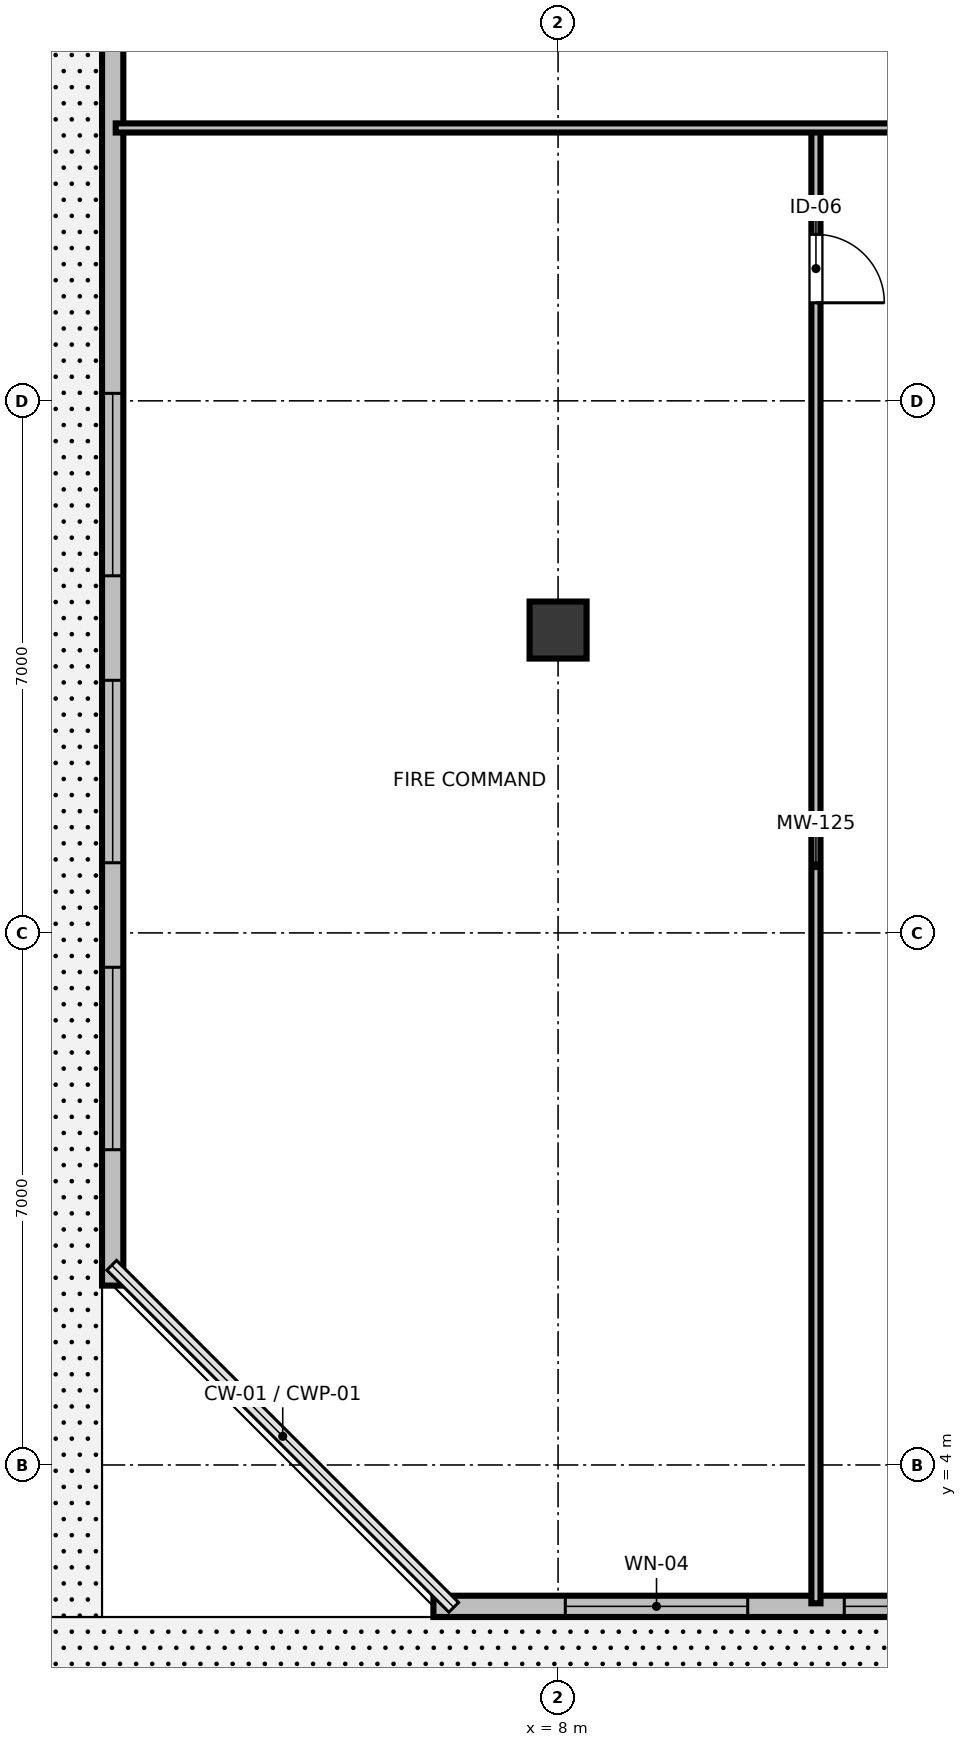
"""IFC4 building model, lengths in metres.
Left out: names, types, materials, properties, quantities, classifications, styles, units other than length and angle.
Written with IfcOpenShell. Run it as: python <this file> out.ifc"""

import sys

from ifc_helpers import new_model, si_unit, direction, frame, frame_2d, origin, origin_2d, place, context, subcontext, project, spatial, rectangle, extrude, element, fill, save


model = new_model("IFC4")
c1 = context("Model", 3, precision=1e-05, world=origin(), true_north=direction((0.0, 1.0)))
c2 = subcontext(c1, "Body", "Model", "MODEL_VIEW")
j1 = project(units=[si_unit("LENGTHUNIT", "METRE"), si_unit("PLANEANGLEUNIT", "RADIAN")], contexts=[c1])
p1 = place(None, origin())
s1 = spatial("IfcSite", under=j1, at=p1, CompositionType="ELEMENT")
p2 = place(p1, origin())
s2 = spatial("IfcBuilding", under=s1, at=p2, CompositionType="ELEMENT")
p3 = place(p2, origin())
s3 = spatial("IfcBuildingStorey", under=s2, at=p3, CompositionType="ELEMENT", Elevation=0.0)
p4 = place(p3, frame((6.36, 2.14, 0.0), z_axis=(0.0, 0.0, 1.0), x_axis=(1.0, 0.0, 0.0)))
e1 = element("IfcWall", 1, at=p4, inside=s3, PredefinedType="STANDARD", context=c2, shape_type="SweptSolid", body=[
    extrude(rectangle(XDim=79.28, YDim=0.28, at=frame_2d((39.64, 0.0))), origin(), (0.0, 0.0, 1.0), 4.72),
])
p5 = place(p4, frame((41.79, 0.0, 0.0)))
e2 = element("IfcOpeningElement", 2, at=p5, cuts=e1, PredefinedType="OPENING", context=c2, shape_type="SweptSolid", body=[
    extrude(rectangle(XDim=2.4, YDim=2.6, at=frame_2d((1.2, 1.3))), frame((0.0, 0.15, 0.0), z_axis=(0.0, -1.0, 0.0), x_axis=(1.0, 0.0, 0.0)), (0.0, 0.0, 1.0), 0.3),
])
p6 = place(p4, frame((1.735, 0.0, 0.85)))
e3 = element("IfcOpeningElement", 3, at=p6, cuts=e1, PredefinedType="OPENING", context=c2, shape_type="SweptSolid", body=[
    extrude(rectangle(XDim=2.4, YDim=2.4, at=frame_2d((1.2, 1.2))), frame((0.0, 0.15, 0.0), z_axis=(0.0, -1.0, 0.0), x_axis=(1.0, 0.0, 0.0)), (0.0, 0.0, 1.0), 0.3),
])
p7 = place(p4, frame((5.406, 0.0, 0.85)))
e4 = element("IfcOpeningElement", 4, at=p7, cuts=e1, PredefinedType="OPENING", context=c2, shape_type="SweptSolid", body=[
    extrude(rectangle(XDim=2.4, YDim=2.4, at=frame_2d((1.2, 1.2))), frame((0.0, 0.15, 0.0), z_axis=(0.0, -1.0, 0.0), x_axis=(1.0, 0.0, 0.0)), (0.0, 0.0, 1.0), 0.3),
])
p8 = place(p4, frame((9.076, 0.0, 0.85)))
e5 = element("IfcOpeningElement", 5, at=p8, cuts=e1, PredefinedType="OPENING", context=c2, shape_type="SweptSolid", body=[
    extrude(rectangle(XDim=2.4, YDim=2.4, at=frame_2d((1.2, 1.2))), frame((0.0, 0.15, 0.0), z_axis=(0.0, -1.0, 0.0), x_axis=(1.0, 0.0, 0.0)), (0.0, 0.0, 1.0), 0.3),
])
p9 = place(p4, frame((12.747, 0.0, 0.85)))
e6 = element("IfcOpeningElement", 6, at=p9, cuts=e1, PredefinedType="OPENING", context=c2, shape_type="SweptSolid", body=[
    extrude(rectangle(XDim=2.4, YDim=2.4, at=frame_2d((1.2, 1.2))), frame((0.0, 0.15, 0.0), z_axis=(0.0, -1.0, 0.0), x_axis=(1.0, 0.0, 0.0)), (0.0, 0.0, 1.0), 0.3),
])
p10 = place(p4, frame((16.417, 0.0, 0.85)))
e7 = element("IfcOpeningElement", 7, at=p10, cuts=e1, PredefinedType="OPENING", context=c2, shape_type="SweptSolid", body=[
    extrude(rectangle(XDim=2.4, YDim=2.4, at=frame_2d((1.2, 1.2))), frame((0.0, 0.15, 0.0), z_axis=(0.0, -1.0, 0.0), x_axis=(1.0, 0.0, 0.0)), (0.0, 0.0, 1.0), 0.3),
])
p11 = place(p4, frame((20.088, 0.0, 0.85)))
e8 = element("IfcOpeningElement", 8, at=p11, cuts=e1, PredefinedType="OPENING", context=c2, shape_type="SweptSolid", body=[
    extrude(rectangle(XDim=2.4, YDim=2.4, at=frame_2d((1.2, 1.2))), frame((0.0, 0.15, 0.0), z_axis=(0.0, -1.0, 0.0), x_axis=(1.0, 0.0, 0.0)), (0.0, 0.0, 1.0), 0.3),
])
p12 = place(p4, frame((23.758, 0.0, 0.85)))
e9 = element("IfcOpeningElement", 9, at=p12, cuts=e1, PredefinedType="OPENING", context=c2, shape_type="SweptSolid", body=[
    extrude(rectangle(XDim=2.4, YDim=2.4, at=frame_2d((1.2, 1.2))), frame((0.0, 0.15, 0.0), z_axis=(0.0, -1.0, 0.0), x_axis=(1.0, 0.0, 0.0)), (0.0, 0.0, 1.0), 0.3),
])
p13 = place(p4, frame((31.099, 0.0, 0.85)))
e10 = element("IfcOpeningElement", 10, at=p13, cuts=e1, PredefinedType="OPENING", context=c2, shape_type="SweptSolid", body=[
    extrude(rectangle(XDim=2.4, YDim=2.4, at=frame_2d((1.2, 1.2))), frame((0.0, 0.15, 0.0), z_axis=(0.0, -1.0, 0.0), x_axis=(1.0, 0.0, 0.0)), (0.0, 0.0, 1.0), 0.3),
])
p14 = place(p4, frame((34.77, 0.0, 0.85)))
e11 = element("IfcOpeningElement", 11, at=p14, cuts=e1, PredefinedType="OPENING", context=c2, shape_type="SweptSolid", body=[
    extrude(rectangle(XDim=2.4, YDim=2.4, at=frame_2d((1.2, 1.2))), frame((0.0, 0.15, 0.0), z_axis=(0.0, -1.0, 0.0), x_axis=(1.0, 0.0, 0.0)), (0.0, 0.0, 1.0), 0.3),
])
p15 = place(p4, frame((45.781, 0.0, 0.85)))
e12 = element("IfcOpeningElement", 12, at=p15, cuts=e1, PredefinedType="OPENING", context=c2, shape_type="SweptSolid", body=[
    extrude(rectangle(XDim=2.4, YDim=2.4, at=frame_2d((1.2, 1.2))), frame((0.0, 0.15, 0.0), z_axis=(0.0, -1.0, 0.0), x_axis=(1.0, 0.0, 0.0)), (0.0, 0.0, 1.0), 0.3),
])
p16 = place(p4, frame((53.122, 0.0, 0.85)))
e13 = element("IfcOpeningElement", 13, at=p16, cuts=e1, PredefinedType="OPENING", context=c2, shape_type="SweptSolid", body=[
    extrude(rectangle(XDim=2.4, YDim=2.4, at=frame_2d((1.2, 1.2))), frame((0.0, 0.15, 0.0), z_axis=(0.0, -1.0, 0.0), x_axis=(1.0, 0.0, 0.0)), (0.0, 0.0, 1.0), 0.3),
])
p17 = place(p4, frame((56.792, 0.0, 0.85)))
e14 = element("IfcOpeningElement", 14, at=p17, cuts=e1, PredefinedType="OPENING", context=c2, shape_type="SweptSolid", body=[
    extrude(rectangle(XDim=2.4, YDim=2.4, at=frame_2d((1.2, 1.2))), frame((0.0, 0.15, 0.0), z_axis=(0.0, -1.0, 0.0), x_axis=(1.0, 0.0, 0.0)), (0.0, 0.0, 1.0), 0.3),
])
p18 = place(p4, frame((60.463, 0.0, 0.85)))
e15 = element("IfcOpeningElement", 15, at=p18, cuts=e1, PredefinedType="OPENING", context=c2, shape_type="SweptSolid", body=[
    extrude(rectangle(XDim=2.4, YDim=2.4, at=frame_2d((1.2, 1.2))), frame((0.0, 0.15, 0.0), z_axis=(0.0, -1.0, 0.0), x_axis=(1.0, 0.0, 0.0)), (0.0, 0.0, 1.0), 0.3),
])
p19 = place(p4, frame((64.133, 0.0, 0.85)))
e16 = element("IfcOpeningElement", 16, at=p19, cuts=e1, PredefinedType="OPENING", context=c2, shape_type="SweptSolid", body=[
    extrude(rectangle(XDim=2.4, YDim=2.4, at=frame_2d((1.2, 1.2))), frame((0.0, 0.15, 0.0), z_axis=(0.0, -1.0, 0.0), x_axis=(1.0, 0.0, 0.0)), (0.0, 0.0, 1.0), 0.3),
])
p20 = place(p4, frame((67.804, 0.0, 0.85)))
e17 = element("IfcOpeningElement", 17, at=p20, cuts=e1, PredefinedType="OPENING", context=c2, shape_type="SweptSolid", body=[
    extrude(rectangle(XDim=2.4, YDim=2.4, at=frame_2d((1.2, 1.2))), frame((0.0, 0.15, 0.0), z_axis=(0.0, -1.0, 0.0), x_axis=(1.0, 0.0, 0.0)), (0.0, 0.0, 1.0), 0.3),
])
p21 = place(p4, frame((71.474, 0.0, 0.85)))
e18 = element("IfcOpeningElement", 18, at=p21, cuts=e1, PredefinedType="OPENING", context=c2, shape_type="SweptSolid", body=[
    extrude(rectangle(XDim=2.4, YDim=2.4, at=frame_2d((1.2, 1.2))), frame((0.0, 0.15, 0.0), z_axis=(0.0, -1.0, 0.0), x_axis=(1.0, 0.0, 0.0)), (0.0, 0.0, 1.0), 0.3),
])
p22 = place(p4, frame((75.145, 0.0, 0.85)))
e19 = element("IfcOpeningElement", 19, at=p22, cuts=e1, PredefinedType="OPENING", context=c2, shape_type="SweptSolid", body=[
    extrude(rectangle(XDim=2.4, YDim=2.4, at=frame_2d((1.2, 1.2))), frame((0.0, 0.15, 0.0), z_axis=(0.0, -1.0, 0.0), x_axis=(1.0, 0.0, 0.0)), (0.0, 0.0, 1.0), 0.3),
])
p23 = place(p3, frame((2.14, 57.64, 0.0), z_axis=(0.0, 0.0, 1.0), x_axis=(0.0, -1.0, 0.0)))
e20 = element("IfcWall", 20, at=p23, inside=s3, PredefinedType="STANDARD", context=c2, shape_type="SweptSolid", body=[
    extrude(rectangle(XDim=51.28, YDim=0.28, at=frame_2d((25.64, 0.0))), origin(), (0.0, 0.0, 1.0), 4.72),
])
p24 = place(p23, frame((29.99, 0.0, 0.0)))
e21 = element("IfcOpeningElement", 21, at=p24, cuts=e20, PredefinedType="OPENING", context=c2, shape_type="SweptSolid", body=[
    extrude(rectangle(XDim=1.8, YDim=2.4, at=frame_2d((0.9, 1.2))), frame((0.0, 0.15, 0.0), z_axis=(0.0, -1.0, 0.0), x_axis=(1.0, 0.0, 0.0)), (0.0, 0.0, 1.0), 0.3),
])
p25 = place(p23, frame((1.788, 0.0, 0.85)))
e22 = element("IfcOpeningElement", 22, at=p25, cuts=e20, PredefinedType="OPENING", context=c2, shape_type="SweptSolid", body=[
    extrude(rectangle(XDim=2.4, YDim=2.4, at=frame_2d((1.2, 1.2))), frame((0.0, 0.15, 0.0), z_axis=(0.0, -1.0, 0.0), x_axis=(1.0, 0.0, 0.0)), (0.0, 0.0, 1.0), 0.3),
])
p26 = place(p23, frame((5.563, 0.0, 0.85)))
e23 = element("IfcOpeningElement", 23, at=p26, cuts=e20, PredefinedType="OPENING", context=c2, shape_type="SweptSolid", body=[
    extrude(rectangle(XDim=2.4, YDim=2.4, at=frame_2d((1.2, 1.2))), frame((0.0, 0.15, 0.0), z_axis=(0.0, -1.0, 0.0), x_axis=(1.0, 0.0, 0.0)), (0.0, 0.0, 1.0), 0.3),
])
p27 = place(p23, frame((9.338, 0.0, 0.85)))
e24 = element("IfcOpeningElement", 24, at=p27, cuts=e20, PredefinedType="OPENING", context=c2, shape_type="SweptSolid", body=[
    extrude(rectangle(XDim=2.4, YDim=2.4, at=frame_2d((1.2, 1.2))), frame((0.0, 0.15, 0.0), z_axis=(0.0, -1.0, 0.0), x_axis=(1.0, 0.0, 0.0)), (0.0, 0.0, 1.0), 0.3),
])
p28 = place(p23, frame((16.889, 0.0, 0.85)))
e25 = element("IfcOpeningElement", 25, at=p28, cuts=e20, PredefinedType="OPENING", context=c2, shape_type="SweptSolid", body=[
    extrude(rectangle(XDim=2.4, YDim=2.4, at=frame_2d((1.2, 1.2))), frame((0.0, 0.15, 0.0), z_axis=(0.0, -1.0, 0.0), x_axis=(1.0, 0.0, 0.0)), (0.0, 0.0, 1.0), 0.3),
])
p29 = place(p23, frame((20.665, 0.0, 0.85)))
e26 = element("IfcOpeningElement", 26, at=p29, cuts=e20, PredefinedType="OPENING", context=c2, shape_type="SweptSolid", body=[
    extrude(rectangle(XDim=2.4, YDim=2.4, at=frame_2d((1.2, 1.2))), frame((0.0, 0.15, 0.0), z_axis=(0.0, -1.0, 0.0), x_axis=(1.0, 0.0, 0.0)), (0.0, 0.0, 1.0), 0.3),
])
p30 = place(p23, frame((24.44, 0.0, 0.85)))
e27 = element("IfcOpeningElement", 27, at=p30, cuts=e20, PredefinedType="OPENING", context=c2, shape_type="SweptSolid", body=[
    extrude(rectangle(XDim=2.4, YDim=2.4, at=frame_2d((1.2, 1.2))), frame((0.0, 0.15, 0.0), z_axis=(0.0, -1.0, 0.0), x_axis=(1.0, 0.0, 0.0)), (0.0, 0.0, 1.0), 0.3),
])
p31 = place(p23, frame((39.542, 0.0, 0.85)))
e28 = element("IfcOpeningElement", 28, at=p31, cuts=e20, PredefinedType="OPENING", context=c2, shape_type="SweptSolid", body=[
    extrude(rectangle(XDim=2.4, YDim=2.4, at=frame_2d((1.2, 1.2))), frame((0.0, 0.15, 0.0), z_axis=(0.0, -1.0, 0.0), x_axis=(1.0, 0.0, 0.0)), (0.0, 0.0, 1.0), 0.3),
])
p32 = place(p23, frame((43.317, 0.0, 0.85)))
e29 = element("IfcOpeningElement", 29, at=p32, cuts=e20, PredefinedType="OPENING", context=c2, shape_type="SweptSolid", body=[
    extrude(rectangle(XDim=2.4, YDim=2.4, at=frame_2d((1.2, 1.2))), frame((0.0, 0.15, 0.0), z_axis=(0.0, -1.0, 0.0), x_axis=(1.0, 0.0, 0.0)), (0.0, 0.0, 1.0), 0.3),
])
p33 = place(p23, frame((47.092, 0.0, 0.85)))
e30 = element("IfcOpeningElement", 30, at=p33, cuts=e20, PredefinedType="OPENING", context=c2, shape_type="SweptSolid", body=[
    extrude(rectangle(XDim=2.4, YDim=2.4, at=frame_2d((1.2, 1.2))), frame((0.0, 0.15, 0.0), z_axis=(0.0, -1.0, 0.0), x_axis=(1.0, 0.0, 0.0)), (0.0, 0.0, 1.0), 0.3),
])
p34 = place(p3, frame((11.393, 21.59, 0.0), z_axis=(0.0, 0.0, 1.0), x_axis=(0.0, -1.0, 0.0)))
e31 = element("IfcWall", 31, at=p34, inside=s3, PredefinedType="MOVABLE", context=c2, shape_type="SweptSolid", body=[
    extrude(rectangle(XDim=19.41, YDim=0.12, at=frame_2d((9.705, 0.0))), origin(), (0.0, 0.0, 1.0), 3.82),
])
p35 = place(p34, frame((1.4, 0.0, 0.0)))
e32 = element("IfcOpeningElement", 32, at=p35, cuts=e31, PredefinedType="OPENING", context=c2, shape_type="SweptSolid", body=[
    extrude(rectangle(XDim=0.9, YDim=2.15, at=frame_2d((0.45, 1.075))), frame((0.0, 0.07, 0.0), z_axis=(0.0, -1.0, 0.0), x_axis=(1.0, 0.0, 0.0)), (0.0, 0.0, 1.0), 0.14),
])
p36 = place(p3, frame((34.65, 21.59, 0.0), z_axis=(0.0, 0.0, 1.0), x_axis=(-1.0, 0.0, 0.0)))
e33 = element("IfcWall", 33, at=p36, inside=s3, PredefinedType="PARTITIONING", context=c2, shape_type="SweptSolid", body=[
    extrude(rectangle(XDim=32.47, YDim=0.12, at=frame_2d((16.235, 0.0))), origin(), (0.0, 0.0, 1.0), 3.82),
])
p37 = place(p3, frame((8.0, 14.984, 0.0), z_axis=(0.0, 0.0, 1.0), x_axis=(1.0, 0.0, 0.0)))
e34 = element("IfcColumn", 34, at=p37, inside=s3, PredefinedType="PILASTER", context=c2, shape_type="SweptSolid", body=[
    extrude(rectangle(XDim=0.75, YDim=0.75, at=origin_2d()), origin(), (0.0, 0.0, 1.0), 4.72),
])
p38 = place(p6, origin())
e35 = element("IfcWindow", 35, at=p38, inside=s3, PartitioningType="SINGLE_PANEL", PredefinedType="WINDOW", context=c2, shape_type="SweptSolid", body=[
    extrude(rectangle(XDim=2.4, YDim=2.4, at=frame_2d((1.2, 1.2))), frame((0.0, 0.03, 0.0), z_axis=(0.0, -1.0, 0.0), x_axis=(1.0, 0.0, 0.0)), (0.0, 0.0, 1.0), 0.06),
])
fill(e3, e35)
p39 = place(p7, origin())
e36 = element("IfcWindow", 36, at=p39, inside=s3, PartitioningType="SINGLE_PANEL", PredefinedType="WINDOW", context=c2, shape_type="SweptSolid", body=[
    extrude(rectangle(XDim=2.4, YDim=2.4, at=frame_2d((1.2, 1.2))), frame((0.0, 0.03, 0.0), z_axis=(0.0, -1.0, 0.0), x_axis=(1.0, 0.0, 0.0)), (0.0, 0.0, 1.0), 0.06),
])
fill(e4, e36)
p40 = place(p31, origin())
e37 = element("IfcWindow", 37, at=p40, inside=s3, PartitioningType="SINGLE_PANEL", PredefinedType="WINDOW", context=c2, shape_type="SweptSolid", body=[
    extrude(rectangle(XDim=2.4, YDim=2.4, at=frame_2d((1.2, 1.2))), frame((0.0, 0.03, 0.0), z_axis=(0.0, -1.0, 0.0), x_axis=(1.0, 0.0, 0.0)), (0.0, 0.0, 1.0), 0.06),
])
fill(e28, e37)
p41 = place(p32, origin())
e38 = element("IfcWindow", 38, at=p41, inside=s3, PartitioningType="SINGLE_PANEL", PredefinedType="WINDOW", context=c2, shape_type="SweptSolid", body=[
    extrude(rectangle(XDim=2.4, YDim=2.4, at=frame_2d((1.2, 1.2))), frame((0.0, 0.03, 0.0), z_axis=(0.0, -1.0, 0.0), x_axis=(1.0, 0.0, 0.0)), (0.0, 0.0, 1.0), 0.06),
])
fill(e29, e38)
p42 = place(p33, origin())
e39 = element("IfcWindow", 39, at=p42, inside=s3, PartitioningType="SINGLE_PANEL", PredefinedType="WINDOW", context=c2, shape_type="SweptSolid", body=[
    extrude(rectangle(XDim=2.4, YDim=2.4, at=frame_2d((1.2, 1.2))), frame((0.0, 0.03, 0.0), z_axis=(0.0, -1.0, 0.0), x_axis=(1.0, 0.0, 0.0)), (0.0, 0.0, 1.0), 0.06),
])
fill(e30, e39)
p43 = place(p35, origin())
e40 = element("IfcDoor", 40, at=p43, inside=s3, OperationType="SINGLE_SWING_RIGHT", PredefinedType="DOOR", context=c2, shape_type="SweptSolid", body=[
    extrude(rectangle(XDim=0.9, YDim=2.15, at=frame_2d((0.45, 1.075))), frame((0.0, 0.025, 0.0), z_axis=(0.0, -1.0, 0.0), x_axis=(1.0, 0.0, 0.0)), (0.0, 0.0, 1.0), 0.05),
])
fill(e32, e40)
save(model, sys.argv[1])
